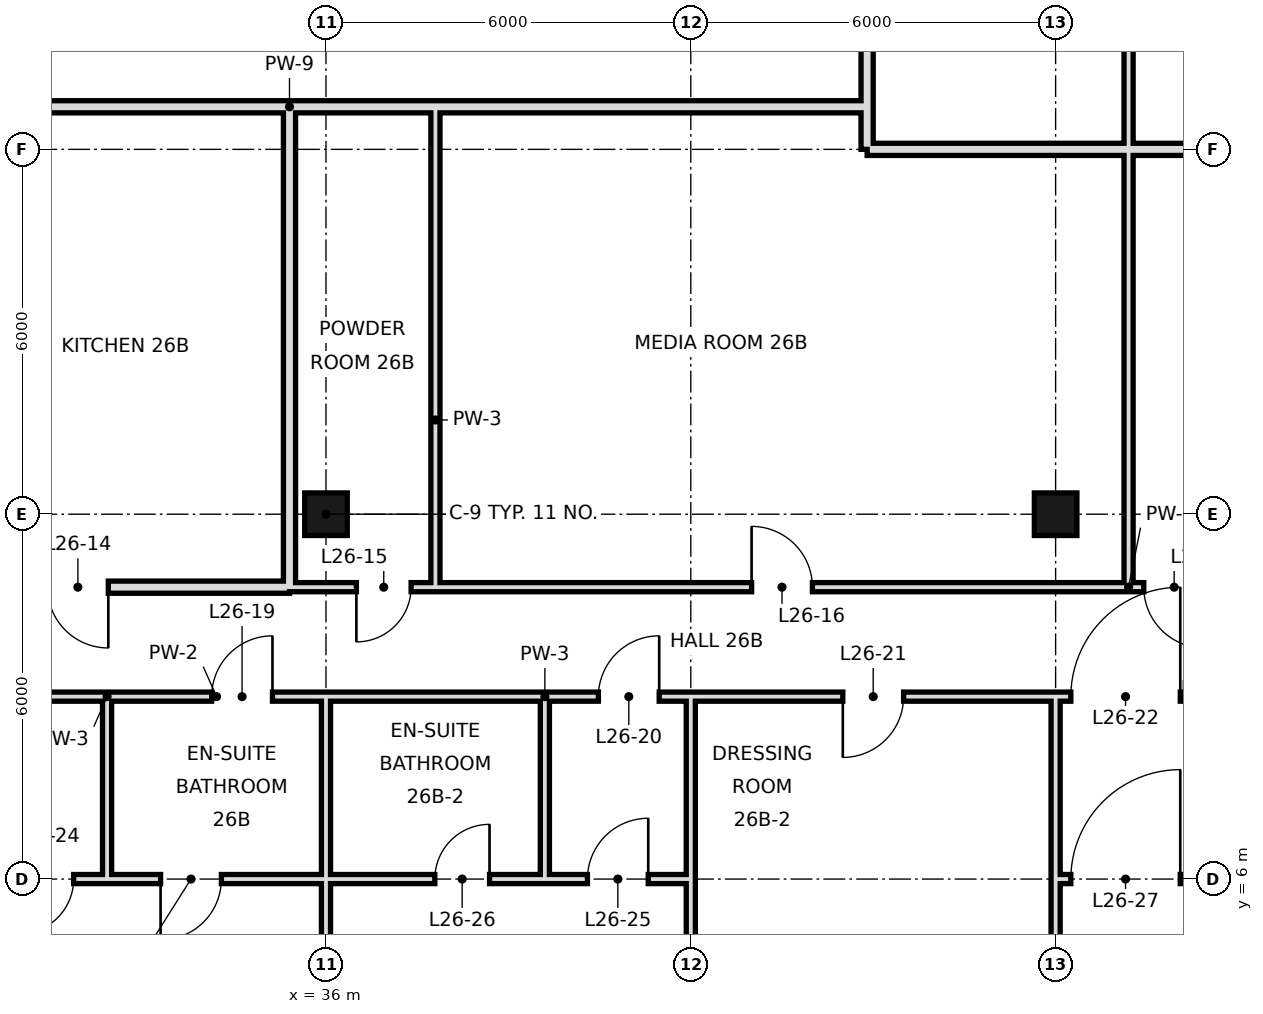
"""IFC4 building model, lengths in metres.
Left out: names, types, materials, properties, quantities, classifications, styles, units other than length and angle.
Written with IfcOpenShell. Run it as: python <this file> out.ifc"""

import sys

from ifc_helpers import new_model, si_unit, direction, frame, frame_2d, origin, origin_2d, place, context, subcontext, project, spatial, rectangle, hollow_rectangle, extrude, element, fill, save


model = new_model("IFC4")
c1 = context("Model", 3, precision=1e-05, world=origin(), true_north=direction((0.0, 1.0)))
c2 = subcontext(c1, "Body", "Model", "MODEL_VIEW")
j1 = project(units=[si_unit("LENGTHUNIT", "METRE"), si_unit("PLANEANGLEUNIT", "RADIAN")], contexts=[c1])
p1 = place(None, origin())
s1 = spatial("IfcSite", under=j1, at=p1, CompositionType="ELEMENT")
p2 = place(p1, origin())
s2 = spatial("IfcBuilding", under=s1, at=p2, CompositionType="ELEMENT")
p3 = place(p2, frame((0.0, 0.0, 119.6)))
s3 = spatial("IfcBuildingStorey", under=s2, at=p3, CompositionType="ELEMENT", Elevation=119.6)
for number, where, z_axis, x_axis in (
    (1, (36.0, 12.0, 0.0), (0.0, 0.0, 1.0), (1.0, 0.0, 0.0)),
    (2, (48.0, 12.0, 0.0), (0.0, 0.0, 1.0), (1.0, 0.0, 0.0)),
):
    element("IfcColumn", number, at=place(p3, frame(where, z_axis=z_axis, x_axis=x_axis)), inside=s3, PredefinedType="COLUMN", context=c2, shape_type="SweptSolid", body=[
        extrude(hollow_rectangle(XDim=0.7, YDim=0.7, WallThickness=0.036, at=origin_2d()), origin(), (0.0, 0.0, 1.0), 3.6),
    ])
p4 = place(p3, frame((32.4, 6.0, 0.0), z_axis=(0.0, 0.0, 1.0), x_axis=(0.0, 1.0, 0.0)))
e3 = element("IfcWall", 3, at=p4, inside=s3, PredefinedType="PARTITIONING", context=c2, shape_type="SweptSolid", body=[
    extrude(rectangle(XDim=3.0, YDim=0.15, at=frame_2d((1.5, 0.0))), origin(), (0.0, 0.0, 1.0), 3.42),
])
p5 = place(p3, frame((35.4, 10.8, 0.0), z_axis=(0.0, 0.0, 1.0), x_axis=(0.0, 1.0, 0.0)))
e4 = element("IfcWall", 4, at=p5, inside=s3, PredefinedType="SOLIDWALL", context=c2, shape_type="SweptSolid", body=[
    extrude(rectangle(XDim=7.9, YDim=0.2, at=frame_2d((3.95, 0.0))), origin(), (0.0, 0.0, 1.0), 2.72),
])
p6 = place(p3, frame((36.0, 0.0, 0.0), z_axis=(0.0, 0.0, 1.0), x_axis=(0.0, 1.0, 0.0)))
e5 = element("IfcWall", 5, at=p6, inside=s3, PredefinedType="PARTITIONING", context=c2, shape_type="SweptSolid", body=[
    extrude(rectangle(XDim=6.0, YDim=0.15, at=frame_2d((3.0, 0.0))), origin(), (0.0, 0.0, 1.0), 2.72),
])
p7 = place(p3, frame((36.0, 6.0, 0.0), z_axis=(0.0, 0.0, 1.0), x_axis=(0.0, 1.0, 0.0)))
e6 = element("IfcWall", 6, at=p7, inside=s3, PredefinedType="PARTITIONING", context=c2, shape_type="SweptSolid", body=[
    extrude(rectangle(XDim=3.0, YDim=0.15, at=frame_2d((1.5, 0.0))), origin(), (0.0, 0.0, 1.0), 2.72),
])
p8 = place(p3, frame((37.8, 10.8, 0.0), z_axis=(0.0, 0.0, 1.0), x_axis=(0.0, 1.0, 0.0)))
e7 = element("IfcWall", 7, at=p8, inside=s3, PredefinedType="PARTITIONING", context=c2, shape_type="SweptSolid", body=[
    extrude(rectangle(XDim=7.9, YDim=0.15, at=frame_2d((3.95, 0.0))), origin(), (0.0, 0.0, 1.0), 3.42),
])
p9 = place(p3, frame((39.6, 6.0, 0.0), z_axis=(0.0, 0.0, 1.0), x_axis=(0.0, 1.0, 0.0)))
e8 = element("IfcWall", 8, at=p9, inside=s3, PredefinedType="PARTITIONING", context=c2, shape_type="SweptSolid", body=[
    extrude(rectangle(XDim=3.0, YDim=0.15, at=frame_2d((1.5, 0.0))), origin(), (0.0, 0.0, 1.0), 3.42),
])
p10 = place(p3, frame((42.0, -0.6, 0.0), z_axis=(0.0, 0.0, 1.0), x_axis=(0.0, 1.0, 0.0)))
e9 = element("IfcWall", 9, at=p10, inside=s3, PredefinedType="PARTITIONING", context=c2, shape_type="SweptSolid", body=[
    extrude(rectangle(XDim=9.6, YDim=0.15, at=frame_2d((4.8, 0.0))), origin(), (0.0, 0.0, 1.0), 2.72),
])
p11 = place(p3, frame((44.9, 18.7, 0.0), z_axis=(0.0, 0.0, 1.0), x_axis=(0.0, 1.0, 0.0)))
e10 = element("IfcWall", 10, at=p11, inside=s3, PredefinedType="SOLIDWALL", context=c2, shape_type="SweptSolid", body=[
    extrude(rectangle(XDim=14.9, YDim=0.2, at=frame_2d((7.45, 0.0))), origin(), (0.0, 0.0, 1.0), 2.97),
])
p12 = place(p11, frame((9.72, 0.0, 0.0)))
e11 = element("IfcOpeningElement", 11, at=p12, cuts=e10, PredefinedType="OPENING", context=c2, shape_type="SweptSolid", body=[
    extrude(rectangle(XDim=1.2, YDim=2.4, at=frame_2d((0.6, 1.2))), frame((0.0, 0.11, 0.0), z_axis=(0.0, -1.0, 0.0), x_axis=(1.0, 0.0, 0.0)), (0.0, 0.0, 1.0), 0.22),
])
p13 = place(p3, frame((44.9, 18.0, 0.0), z_axis=(0.0, 0.0, 1.0), x_axis=(0.0, 1.0, 0.0)))
e12 = element("IfcWall", 12, at=p13, inside=s3, PredefinedType="SOLIDWALL", context=c2, shape_type="SweptSolid", body=[
    extrude(rectangle(XDim=0.7, YDim=0.2, at=frame_2d((0.35, 0.0))), origin(), (0.0, 0.0, 1.0), 2.97),
])
p14 = place(p3, frame((48.0, 0.0, 0.0), z_axis=(0.0, 0.0, 1.0), x_axis=(0.0, 1.0, 0.0)))
e13 = element("IfcWall", 13, at=p14, inside=s3, PredefinedType="PARTITIONING", context=c2, shape_type="SweptSolid", body=[
    extrude(rectangle(XDim=9.0, YDim=0.15, at=frame_2d((4.5, 0.0))), origin(), (0.0, 0.0, 1.0), 2.72),
])
p15 = place(p3, frame((49.2, 10.8, 0.0), z_axis=(0.0, 0.0, 1.0), x_axis=(0.0, 1.0, 0.0)))
e14 = element("IfcWall", 14, at=p15, inside=s3, PredefinedType="PARTITIONING", context=c2, shape_type="SweptSolid", body=[
    extrude(rectangle(XDim=20.4, YDim=0.15, at=frame_2d((10.2, 0.0))), origin(), (0.0, 0.0, 1.0), 3.42),
])
p16 = place(p15, frame((17.68, 0.0, 0.0)))
e15 = element("IfcOpeningElement", 15, at=p16, cuts=e14, PredefinedType="OPENING", context=c2, shape_type="SweptSolid", body=[
    extrude(rectangle(XDim=1.0, YDim=2.4, at=frame_2d((0.5, 1.2))), frame((0.0, 0.085, 0.0), z_axis=(0.0, -1.0, 0.0), x_axis=(1.0, 0.0, 0.0)), (0.0, 0.0, 1.0), 0.17),
])
p17 = place(p15, frame((9.88, 0.0, 0.0)))
e16 = element("IfcOpeningElement", 16, at=p17, cuts=e14, PredefinedType="OPENING", context=c2, shape_type="SweptSolid", body=[
    extrude(rectangle(XDim=1.0, YDim=2.4, at=frame_2d((0.5, 1.2))), frame((0.0, 0.085, 0.0), z_axis=(0.0, -1.0, 0.0), x_axis=(1.0, 0.0, 0.0)), (0.0, 0.0, 1.0), 0.17),
])
p18 = place(p3, frame((30.0, 10.8, 0.0), z_axis=(0.0, 0.0, 1.0), x_axis=(1.0, 0.0, 0.0)))
e17 = element("IfcWall", 17, at=p18, inside=s3, PredefinedType="SOLIDWALL", context=c2, shape_type="SweptSolid", body=[
    extrude(rectangle(XDim=5.4, YDim=0.2, at=frame_2d((2.7, 0.0))), origin(), (0.0, 0.0, 1.0), 2.72),
])
p19 = place(p18, frame((1.42, 0.0, 0.0)))
e18 = element("IfcOpeningElement", 18, at=p19, cuts=e17, PredefinedType="OPENING", context=c2, shape_type="SweptSolid", body=[
    extrude(rectangle(XDim=1.0, YDim=2.4, at=frame_2d((0.5, 1.2))), frame((0.0, 0.11, 0.0), z_axis=(0.0, -1.0, 0.0), x_axis=(1.0, 0.0, 0.0)), (0.0, 0.0, 1.0), 0.22),
])
p20 = place(p3, frame((37.8, 10.8, 0.0), z_axis=(0.0, 0.0, 1.0), x_axis=(1.0, 0.0, 0.0)))
e19 = element("IfcWall", 19, at=p20, inside=s3, PredefinedType="PARTITIONING", context=c2, shape_type="SweptSolid", body=[
    extrude(rectangle(XDim=22.8, YDim=0.15, at=frame_2d((11.4, 0.0))), origin(), (0.0, 0.0, 1.0), 3.42),
])
p21 = place(p20, frame((5.2, 0.0, 0.0)))
e20 = element("IfcOpeningElement", 20, at=p21, cuts=e19, PredefinedType="OPENING", context=c2, shape_type="SweptSolid", body=[
    extrude(rectangle(XDim=1.0, YDim=2.4, at=frame_2d((0.5, 1.2))), frame((0.0, 0.085, 0.0), z_axis=(0.0, -1.0, 0.0), x_axis=(1.0, 0.0, 0.0)), (0.0, 0.0, 1.0), 0.17),
])
p22 = place(p20, frame((11.65, 0.0, 0.0)))
e21 = element("IfcOpeningElement", 21, at=p22, cuts=e19, PredefinedType="OPENING", context=c2, shape_type="SweptSolid", body=[
    extrude(rectangle(XDim=1.0, YDim=2.4, at=frame_2d((0.5, 1.2))), frame((0.0, 0.085, 0.0), z_axis=(0.0, -1.0, 0.0), x_axis=(1.0, 0.0, 0.0)), (0.0, 0.0, 1.0), 0.17),
])
p23 = place(p3, frame((35.4, 10.8, 0.0), z_axis=(0.0, 0.0, 1.0), x_axis=(1.0, 0.0, 0.0)))
e22 = element("IfcWall", 22, at=p23, inside=s3, PredefinedType="PARTITIONING", context=c2, shape_type="SweptSolid", body=[
    extrude(rectangle(XDim=2.4, YDim=0.15, at=frame_2d((1.2, 0.0))), origin(), (0.0, 0.0, 1.0), 3.42),
])
p24 = place(p23, frame((1.1, 0.0, 0.0)))
e23 = element("IfcOpeningElement", 23, at=p24, cuts=e22, PredefinedType="OPENING", context=c2, shape_type="SweptSolid", body=[
    extrude(rectangle(XDim=0.9, YDim=2.4, at=frame_2d((0.45, 1.2))), frame((0.0, 0.085, 0.0), z_axis=(0.0, -1.0, 0.0), x_axis=(1.0, 0.0, 0.0)), (0.0, 0.0, 1.0), 0.17),
])
p25 = place(p3, frame((44.9, 18.0, 0.0), z_axis=(0.0, 0.0, 1.0), x_axis=(1.0, 0.0, 0.0)))
e24 = element("IfcWall", 24, at=p25, inside=s3, PredefinedType="SOLIDWALL", context=c2, shape_type="SweptSolid", body=[
    extrude(rectangle(XDim=15.7, YDim=0.2, at=frame_2d((7.85, 0.0))), origin(), (0.0, 0.0, 1.0), 2.72),
])
p26 = place(p3, frame((35.4, 18.7, 0.0), z_axis=(0.0, 0.0, 1.0), x_axis=(1.0, 0.0, 0.0)))
e25 = element("IfcWall", 25, at=p26, inside=s3, PredefinedType="SOLIDWALL", context=c2, shape_type="SweptSolid", body=[
    extrude(rectangle(XDim=9.5, YDim=0.2, at=frame_2d((4.75, 0.0))), origin(), (0.0, 0.0, 1.0), 2.72),
])
p27 = place(p3, frame((30.0, 18.7, 0.0), z_axis=(0.0, 0.0, 1.0), x_axis=(1.0, 0.0, 0.0)))
e26 = element("IfcWall", 26, at=p27, inside=s3, PredefinedType="SOLIDWALL", context=c2, shape_type="SweptSolid", body=[
    extrude(rectangle(XDim=5.4, YDim=0.2, at=frame_2d((2.7, 0.0))), origin(), (0.0, 0.0, 1.0), 2.72),
])
p28 = place(p3, frame((32.4, 6.0, 0.0), z_axis=(0.0, 0.0, 1.0), x_axis=(1.0, 0.0, 0.0)))
e27 = element("IfcWall", 27, at=p28, inside=s3, PredefinedType="PARTITIONING", context=c2, shape_type="SweptSolid", body=[
    extrude(rectangle(XDim=3.6, YDim=0.15, at=frame_2d((1.8, 0.0))), origin(), (0.0, 0.0, 1.0), 2.97),
])
p29 = place(p28, frame((0.88, 0.0, 0.0)))
e28 = element("IfcOpeningElement", 28, at=p29, cuts=e27, PredefinedType="OPENING", context=c2, shape_type="SweptSolid", body=[
    extrude(rectangle(XDim=1.0, YDim=2.4, at=frame_2d((0.5, 1.2))), frame((0.0, 0.085, 0.0), z_axis=(0.0, -1.0, 0.0), x_axis=(1.0, 0.0, 0.0)), (0.0, 0.0, 1.0), 0.17),
])
p30 = place(p3, frame((39.6, 6.0, 0.0), z_axis=(0.0, 0.0, 1.0), x_axis=(1.0, 0.0, 0.0)))
e29 = element("IfcWall", 29, at=p30, inside=s3, PredefinedType="PARTITIONING", context=c2, shape_type="SweptSolid", body=[
    extrude(rectangle(XDim=2.4, YDim=0.15, at=frame_2d((1.2, 0.0))), origin(), (0.0, 0.0, 1.0), 2.97),
])
p31 = place(p30, frame((0.7, 0.0, 0.0)))
e30 = element("IfcOpeningElement", 30, at=p31, cuts=e29, PredefinedType="OPENING", context=c2, shape_type="SweptSolid", body=[
    extrude(rectangle(XDim=1.0, YDim=2.4, at=frame_2d((0.5, 1.2))), frame((0.0, 0.085, 0.0), z_axis=(0.0, -1.0, 0.0), x_axis=(1.0, 0.0, 0.0)), (0.0, 0.0, 1.0), 0.17),
])
p32 = place(p3, frame((48.0, 6.0, 0.0), z_axis=(0.0, 0.0, 1.0), x_axis=(1.0, 0.0, 0.0)))
e31 = element("IfcWall", 31, at=p32, inside=s3, PredefinedType="PARTITIONING", context=c2, shape_type="SweptSolid", body=[
    extrude(rectangle(XDim=12.0, YDim=0.15, at=frame_2d((6.0, 0.0))), origin(), (0.0, 0.0, 1.0), 2.72),
])
p33 = place(p32, frame((0.25, 0.0, 0.0)))
e32 = element("IfcOpeningElement", 32, at=p33, cuts=e31, PredefinedType="OPENING", context=c2, shape_type="SweptSolid", body=[
    extrude(rectangle(XDim=1.8, YDim=2.4, at=frame_2d((0.9, 1.2))), frame((0.0, 0.085, 0.0), z_axis=(0.0, -1.0, 0.0), x_axis=(1.0, 0.0, 0.0)), (0.0, 0.0, 1.0), 0.17),
])
p34 = place(p3, frame((30.0, 6.0, 0.0), z_axis=(0.0, 0.0, 1.0), x_axis=(1.0, 0.0, 0.0)))
e33 = element("IfcWall", 33, at=p34, inside=s3, PredefinedType="PARTITIONING", context=c2, shape_type="SweptSolid", body=[
    extrude(rectangle(XDim=2.4, YDim=0.15, at=frame_2d((1.2, 0.0))), origin(), (0.0, 0.0, 1.0), 2.97),
])
p35 = place(p34, frame((0.95, 0.0, 0.0)))
e34 = element("IfcOpeningElement", 34, at=p35, cuts=e33, PredefinedType="OPENING", context=c2, shape_type="SweptSolid", body=[
    extrude(rectangle(XDim=0.9, YDim=2.4, at=frame_2d((0.45, 1.2))), frame((0.0, 0.085, 0.0), z_axis=(0.0, -1.0, 0.0), x_axis=(1.0, 0.0, 0.0)), (0.0, 0.0, 1.0), 0.17),
])
p36 = place(p3, frame((36.0, 6.0, 0.0), z_axis=(0.0, 0.0, 1.0), x_axis=(1.0, 0.0, 0.0)))
e35 = element("IfcWall", 35, at=p36, inside=s3, PredefinedType="PARTITIONING", context=c2, shape_type="SweptSolid", body=[
    extrude(rectangle(XDim=3.6, YDim=0.15, at=frame_2d((1.8, 0.0))), origin(), (0.0, 0.0, 1.0), 2.97),
])
p37 = place(p36, frame((1.79, 0.0, 0.0)))
e36 = element("IfcOpeningElement", 36, at=p37, cuts=e35, PredefinedType="OPENING", context=c2, shape_type="SweptSolid", body=[
    extrude(rectangle(XDim=0.9, YDim=2.4, at=frame_2d((0.45, 1.2))), frame((0.0, 0.085, 0.0), z_axis=(0.0, -1.0, 0.0), x_axis=(1.0, 0.0, 0.0)), (0.0, 0.0, 1.0), 0.17),
])
p38 = place(p3, frame((32.4, 9.0, 0.0), z_axis=(0.0, 0.0, 1.0), x_axis=(1.0, 0.0, 0.0)))
e37 = element("IfcWall", 37, at=p38, inside=s3, PredefinedType="PARTITIONING", context=c2, shape_type="SweptSolid", body=[
    extrude(rectangle(XDim=3.6, YDim=0.15, at=frame_2d((1.8, 0.0))), origin(), (0.0, 0.0, 1.0), 3.42),
])
p39 = place(p38, frame((1.72, 0.0, 0.0)))
e38 = element("IfcOpeningElement", 38, at=p39, cuts=e37, PredefinedType="OPENING", context=c2, shape_type="SweptSolid", body=[
    extrude(rectangle(XDim=1.0, YDim=2.4, at=frame_2d((0.5, 1.2))), frame((0.0, 0.085, 0.0), z_axis=(0.0, -1.0, 0.0), x_axis=(1.0, 0.0, 0.0)), (0.0, 0.0, 1.0), 0.17),
])
p40 = place(p3, frame((39.6, 9.0, 0.0), z_axis=(0.0, 0.0, 1.0), x_axis=(1.0, 0.0, 0.0)))
e39 = element("IfcWall", 39, at=p40, inside=s3, PredefinedType="PARTITIONING", context=c2, shape_type="SweptSolid", body=[
    extrude(rectangle(XDim=21.0, YDim=0.15, at=frame_2d((10.5, 0.0))), origin(), (0.0, 0.0, 1.0), 3.42),
])
p41 = place(p40, frame((0.88, 0.0, 0.0)))
e40 = element("IfcOpeningElement", 40, at=p41, cuts=e39, PredefinedType="OPENING", context=c2, shape_type="SweptSolid", body=[
    extrude(rectangle(XDim=1.0, YDim=2.4, at=frame_2d((0.5, 1.2))), frame((0.0, 0.085, 0.0), z_axis=(0.0, -1.0, 0.0), x_axis=(1.0, 0.0, 0.0)), (0.0, 0.0, 1.0), 0.17),
])
p42 = place(p40, frame((4.9, 0.0, 0.0)))
e41 = element("IfcOpeningElement", 41, at=p42, cuts=e39, PredefinedType="OPENING", context=c2, shape_type="SweptSolid", body=[
    extrude(rectangle(XDim=1.0, YDim=2.4, at=frame_2d((0.5, 1.2))), frame((0.0, 0.085, 0.0), z_axis=(0.0, -1.0, 0.0), x_axis=(1.0, 0.0, 0.0)), (0.0, 0.0, 1.0), 0.17),
])
p43 = place(p40, frame((8.65, 0.0, 0.0)))
e42 = element("IfcOpeningElement", 42, at=p43, cuts=e39, PredefinedType="OPENING", context=c2, shape_type="SweptSolid", body=[
    extrude(rectangle(XDim=1.8, YDim=2.4, at=frame_2d((0.9, 1.2))), frame((0.0, 0.085, 0.0), z_axis=(0.0, -1.0, 0.0), x_axis=(1.0, 0.0, 0.0)), (0.0, 0.0, 1.0), 0.17),
])
p44 = place(p3, frame((30.0, 9.0, 0.0), z_axis=(0.0, 0.0, 1.0), x_axis=(1.0, 0.0, 0.0)))
e43 = element("IfcWall", 43, at=p44, inside=s3, PredefinedType="PARTITIONING", context=c2, shape_type="SweptSolid", body=[
    extrude(rectangle(XDim=2.4, YDim=0.15, at=frame_2d((1.2, 0.0))), origin(), (0.0, 0.0, 1.0), 3.42),
])
p45 = place(p3, frame((36.0, 9.0, 0.0), z_axis=(0.0, 0.0, 1.0), x_axis=(1.0, 0.0, 0.0)))
e44 = element("IfcWall", 44, at=p45, inside=s3, PredefinedType="PARTITIONING", context=c2, shape_type="SweptSolid", body=[
    extrude(rectangle(XDim=3.6, YDim=0.15, at=frame_2d((1.8, 0.0))), origin(), (0.0, 0.0, 1.0), 3.42),
])
p46 = place(p19, origin())
e45 = element("IfcDoor", 45, at=p46, inside=s3, OperationType="SINGLE_SWING_RIGHT", PredefinedType="DOOR", context=c2, shape_type="SweptSolid", body=[
    extrude(rectangle(XDim=1.0, YDim=2.4, at=frame_2d((0.5, 1.2))), frame((0.0, 0.025, 0.0), z_axis=(0.0, -1.0, 0.0), x_axis=(1.0, 0.0, 0.0)), (0.0, 0.0, 1.0), 0.05),
])
fill(e18, e45)
p47 = place(p24, frame((0.9, 0.0, 0.0), z_axis=(0.0, 0.0, 1.0), x_axis=(-1.0, 0.0, 0.0)))
e46 = element("IfcDoor", 46, at=p47, inside=s3, OperationType="SINGLE_SWING_RIGHT", PredefinedType="DOOR", context=c2, shape_type="SweptSolid", body=[
    extrude(rectangle(XDim=0.9, YDim=2.4, at=frame_2d((0.45, 1.2))), frame((0.0, 0.025, 0.0), z_axis=(0.0, -1.0, 0.0), x_axis=(1.0, 0.0, 0.0)), (0.0, 0.0, 1.0), 0.05),
])
fill(e23, e46)
p48 = place(p21, origin())
e47 = element("IfcDoor", 47, at=p48, inside=s3, OperationType="SINGLE_SWING_LEFT", PredefinedType="DOOR", context=c2, shape_type="SweptSolid", body=[
    extrude(rectangle(XDim=1.0, YDim=2.4, at=frame_2d((0.5, 1.2))), frame((0.0, 0.025, 0.0), z_axis=(0.0, -1.0, 0.0), x_axis=(1.0, 0.0, 0.0)), (0.0, 0.0, 1.0), 0.05),
])
fill(e20, e47)
p49 = place(p22, origin())
e48 = element("IfcDoor", 48, at=p49, inside=s3, OperationType="SINGLE_SWING_RIGHT", PredefinedType="DOOR", context=c2, shape_type="SweptSolid", body=[
    extrude(rectangle(XDim=1.0, YDim=2.4, at=frame_2d((0.5, 1.2))), frame((0.0, 0.025, 0.0), z_axis=(0.0, -1.0, 0.0), x_axis=(1.0, 0.0, 0.0)), (0.0, 0.0, 1.0), 0.05),
])
fill(e21, e48)
p50 = place(p39, frame((1.0, 0.0, 0.0), z_axis=(0.0, 0.0, 1.0), x_axis=(-1.0, 0.0, 0.0)))
e49 = element("IfcDoor", 49, at=p50, inside=s3, OperationType="SINGLE_SWING_LEFT", PredefinedType="DOOR", context=c2, shape_type="SweptSolid", body=[
    extrude(rectangle(XDim=1.0, YDim=2.4, at=frame_2d((0.5, 1.2))), frame((0.0, 0.025, 0.0), z_axis=(0.0, -1.0, 0.0), x_axis=(1.0, 0.0, 0.0)), (0.0, 0.0, 1.0), 0.05),
])
fill(e38, e49)
p51 = place(p41, frame((1.0, 0.0, 0.0), z_axis=(0.0, 0.0, 1.0), x_axis=(-1.0, 0.0, 0.0)))
e50 = element("IfcDoor", 50, at=p51, inside=s3, OperationType="SINGLE_SWING_LEFT", PredefinedType="DOOR", context=c2, shape_type="SweptSolid", body=[
    extrude(rectangle(XDim=1.0, YDim=2.4, at=frame_2d((0.5, 1.2))), frame((0.0, 0.025, 0.0), z_axis=(0.0, -1.0, 0.0), x_axis=(1.0, 0.0, 0.0)), (0.0, 0.0, 1.0), 0.05),
])
fill(e40, e50)
p52 = place(p42, frame((1.0, 0.0, 0.0), z_axis=(0.0, 0.0, 1.0), x_axis=(-1.0, 0.0, 0.0)))
e51 = element("IfcDoor", 51, at=p52, inside=s3, OperationType="SINGLE_SWING_RIGHT", PredefinedType="DOOR", context=c2, shape_type="SweptSolid", body=[
    extrude(rectangle(XDim=1.0, YDim=2.4, at=frame_2d((0.5, 1.2))), frame((0.0, 0.025, 0.0), z_axis=(0.0, -1.0, 0.0), x_axis=(1.0, 0.0, 0.0)), (0.0, 0.0, 1.0), 0.05),
])
fill(e41, e51)
p53 = place(p43, frame((1.8, 0.0, 0.0), z_axis=(0.0, 0.0, 1.0), x_axis=(-1.0, 0.0, 0.0)))
e52 = element("IfcDoor", 52, at=p53, inside=s3, OperationType="SINGLE_SWING_LEFT", PredefinedType="DOOR", context=c2, shape_type="SweptSolid", body=[
    extrude(rectangle(XDim=1.8, YDim=2.4, at=frame_2d((0.9, 1.2))), frame((0.0, 0.025, 0.0), z_axis=(0.0, -1.0, 0.0), x_axis=(1.0, 0.0, 0.0)), (0.0, 0.0, 1.0), 0.05),
])
fill(e42, e52)
p54 = place(p29, frame((1.0, 0.0, 0.0), z_axis=(0.0, 0.0, 1.0), x_axis=(-1.0, 0.0, 0.0)))
e53 = element("IfcDoor", 53, at=p54, inside=s3, OperationType="SINGLE_SWING_RIGHT", PredefinedType="DOOR", context=c2, shape_type="SweptSolid", body=[
    extrude(rectangle(XDim=1.0, YDim=2.4, at=frame_2d((0.5, 1.2))), frame((0.0, 0.025, 0.0), z_axis=(0.0, -1.0, 0.0), x_axis=(1.0, 0.0, 0.0)), (0.0, 0.0, 1.0), 0.05),
])
fill(e28, e53)
p55 = place(p35, frame((0.9, 0.0, 0.0), z_axis=(0.0, 0.0, 1.0), x_axis=(-1.0, 0.0, 0.0)))
e54 = element("IfcDoor", 54, at=p55, inside=s3, OperationType="SINGLE_SWING_RIGHT", PredefinedType="DOOR", context=c2, shape_type="SweptSolid", body=[
    extrude(rectangle(XDim=0.9, YDim=2.4, at=frame_2d((0.45, 1.2))), frame((0.0, 0.025, 0.0), z_axis=(0.0, -1.0, 0.0), x_axis=(1.0, 0.0, 0.0)), (0.0, 0.0, 1.0), 0.05),
])
fill(e34, e54)
p56 = place(p31, frame((1.0, 0.0, 0.0), z_axis=(0.0, 0.0, 1.0), x_axis=(-1.0, 0.0, 0.0)))
e55 = element("IfcDoor", 55, at=p56, inside=s3, OperationType="SINGLE_SWING_LEFT", PredefinedType="DOOR", context=c2, shape_type="SweptSolid", body=[
    extrude(rectangle(XDim=1.0, YDim=2.4, at=frame_2d((0.5, 1.2))), frame((0.0, 0.025, 0.0), z_axis=(0.0, -1.0, 0.0), x_axis=(1.0, 0.0, 0.0)), (0.0, 0.0, 1.0), 0.05),
])
fill(e30, e55)
p57 = place(p37, frame((0.9, 0.0, 0.0), z_axis=(0.0, 0.0, 1.0), x_axis=(-1.0, 0.0, 0.0)))
e56 = element("IfcDoor", 56, at=p57, inside=s3, OperationType="SINGLE_SWING_LEFT", PredefinedType="DOOR", context=c2, shape_type="SweptSolid", body=[
    extrude(rectangle(XDim=0.9, YDim=2.4, at=frame_2d((0.45, 1.2))), frame((0.0, 0.025, 0.0), z_axis=(0.0, -1.0, 0.0), x_axis=(1.0, 0.0, 0.0)), (0.0, 0.0, 1.0), 0.05),
])
fill(e36, e56)
p58 = place(p33, frame((1.8, 0.0, 0.0), z_axis=(0.0, 0.0, 1.0), x_axis=(-1.0, 0.0, 0.0)))
e57 = element("IfcDoor", 57, at=p58, inside=s3, OperationType="SINGLE_SWING_LEFT", PredefinedType="DOOR", context=c2, shape_type="SweptSolid", body=[
    extrude(rectangle(XDim=1.8, YDim=2.4, at=frame_2d((0.9, 1.2))), frame((0.0, 0.025, 0.0), z_axis=(0.0, -1.0, 0.0), x_axis=(1.0, 0.0, 0.0)), (0.0, 0.0, 1.0), 0.05),
])
fill(e32, e57)
save(model, sys.argv[1])
